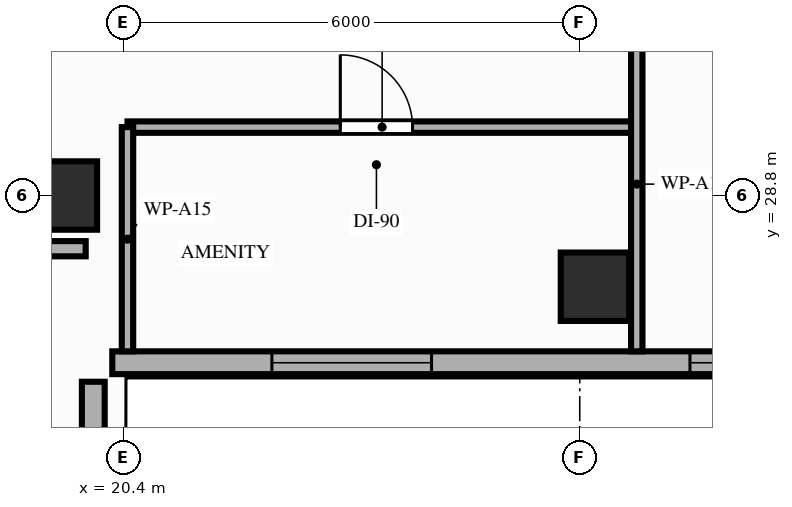
"""IFC4 building model, lengths in metres.
Left out: names, types, materials, properties, quantities, classifications, styles, units other than length and angle.
Written with IfcOpenShell. Run it as: python <this file> out.ifc"""

import sys

from ifc_helpers import new_model, si_unit, direction, frame, frame_2d, origin, origin_2d, place, context, subcontext, project, spatial, rectangle, extrude, element, fill, save


model = new_model("IFC4")
c1 = context("Model", 3, precision=1e-05, world=origin(), true_north=direction((0.0, 1.0)))
c2 = subcontext(c1, "Body", "Model", "MODEL_VIEW")
j1 = project(units=[si_unit("LENGTHUNIT", "METRE"), si_unit("PLANEANGLEUNIT", "RADIAN")], contexts=[c1])
p1 = place(None, origin())
s1 = spatial("IfcSite", under=j1, at=p1, CompositionType="ELEMENT")
p2 = place(p1, origin())
s2 = spatial("IfcBuilding", under=s1, at=p2, CompositionType="ELEMENT")
p3 = place(p2, frame((0.0, 0.0, 182.4)))
s3 = spatial("IfcBuildingStorey", under=s2, at=p3, CompositionType="ELEMENT", Elevation=182.4)
for number, where, z_axis, x_axis in (
    (1, (19.6, 28.8, 0.0), (0.0, 0.0, 1.0), (1.0, 0.0, 0.0)),
    (2, (26.6, 27.6, 0.0), (0.0, 0.0, 1.0), (1.0, 0.0, 0.0)),
):
    element("IfcColumn", number, at=place(p3, frame(where, z_axis=z_axis, x_axis=x_axis)), inside=s3, PredefinedType="COLUMN", context=c2, shape_type="SweptSolid", body=[
        extrude(rectangle(XDim=0.9, YDim=0.9, at=origin_2d()), origin(), (0.0, 0.0, 1.0), 3.2),
    ])
p4 = place(p3, frame((20.0, 8.8, 0.0), z_axis=(0.0, 0.0, 1.0), x_axis=(0.0, 1.0, 0.0)))
e3 = element("IfcWall", 3, at=p4, inside=s3, PredefinedType="STANDARD", context=c2, shape_type="SweptSolid", body=[
    extrude(rectangle(XDim=17.55, YDim=0.3, at=frame_2d((8.775, 0.0))), origin(), (0.0, 0.0, 1.0), 2.45),
])
p5 = place(p4, frame((5.12, 0.0, 0.85)))
e4 = element("IfcOpeningElement", 4, at=p5, cuts=e3, PredefinedType="OPENING", context=c2, shape_type="SweptSolid", body=[
    extrude(rectangle(XDim=2.1, YDim=1.35, at=frame_2d((1.05, 0.675))), frame((0.0, 0.16, 0.0), z_axis=(0.0, -1.0, 0.0), x_axis=(1.0, 0.0, 0.0)), (0.0, 0.0, 1.0), 0.32),
])
p6 = place(p3, frame((20.25, 26.6, 0.0), z_axis=(0.0, 0.0, 1.0), x_axis=(1.0, 0.0, 0.0)))
e5 = element("IfcWall", 5, at=p6, inside=s3, PredefinedType="STANDARD", context=c2, shape_type="SweptSolid", body=[
    extrude(rectangle(XDim=21.35, YDim=0.3, at=frame_2d((10.675, 0.0))), origin(), (0.0, 0.0, 1.0), 2.71),
])
p7 = place(p6, frame((18.43, 0.0, 0.85)))
e6 = element("IfcOpeningElement", 6, at=p7, cuts=e5, PredefinedType="OPENING", context=c2, shape_type="SweptSolid", body=[
    extrude(rectangle(XDim=2.1, YDim=1.61, at=frame_2d((1.05, 0.805))), frame((0.0, 0.16, 0.0), z_axis=(0.0, -1.0, 0.0), x_axis=(1.0, 0.0, 0.0)), (0.0, 0.0, 1.0), 0.32),
])
p8 = place(p6, frame((2.1, 0.0, 0.85)))
e7 = element("IfcOpeningElement", 7, at=p8, cuts=e5, PredefinedType="OPENING", context=c2, shape_type="SweptSolid", body=[
    extrude(rectangle(XDim=2.1, YDim=1.61, at=frame_2d((1.05, 0.805))), frame((0.0, 0.16, 0.0), z_axis=(0.0, -1.0, 0.0), x_axis=(1.0, 0.0, 0.0)), (0.0, 0.0, 1.0), 0.32),
])
p9 = place(p6, frame((7.6, 0.0, 0.85)))
e8 = element("IfcOpeningElement", 8, at=p9, cuts=e5, PredefinedType="OPENING", context=c2, shape_type="SweptSolid", body=[
    extrude(rectangle(XDim=2.1, YDim=1.61, at=frame_2d((1.05, 0.805))), frame((0.0, 0.16, 0.0), z_axis=(0.0, -1.0, 0.0), x_axis=(1.0, 0.0, 0.0)), (0.0, 0.0, 1.0), 0.32),
])
p10 = place(p3, frame((11.01, 28.1, 0.0), z_axis=(0.0, 0.0, 1.0), x_axis=(1.0, 0.0, 0.0)))
e9 = element("IfcWall", 9, at=p10, inside=s3, PredefinedType="PARTITIONING", context=c2, shape_type="SweptSolid", body=[
    extrude(rectangle(XDim=8.89, YDim=0.2, at=frame_2d((4.445, 0.0))), origin(), (0.0, 0.0, 1.0), 2.45),
])
p11 = place(p3, frame((20.45, 29.7, 0.0), z_axis=(0.0, 0.0, 1.0), x_axis=(1.0, 0.0, 0.0)))
e10 = element("IfcWall", 10, at=p11, inside=s3, PredefinedType="PARTITIONING", context=c2, shape_type="SweptSolid", body=[
    extrude(rectangle(XDim=6.7, YDim=0.15, at=frame_2d((3.35, 0.0))), origin(), (0.0, 0.0, 1.0), 3.02),
])
p12 = place(p11, frame((2.8, 0.0, 0.0)))
e11 = element("IfcOpeningElement", 11, at=p12, cuts=e10, PredefinedType="OPENING", context=c2, shape_type="SweptSolid", body=[
    extrude(rectangle(XDim=0.95, YDim=2.15, at=frame_2d((0.475, 1.075))), frame((0.0, 0.085, 0.0), z_axis=(0.0, -1.0, 0.0), x_axis=(1.0, 0.0, 0.0)), (0.0, 0.0, 1.0), 0.17),
])
p13 = place(p3, frame((20.45, 26.75, 0.0), z_axis=(0.0, 0.0, 1.0), x_axis=(0.0, 1.0, 0.0)))
e12 = element("IfcWall", 12, at=p13, inside=s3, PredefinedType="PARTITIONING", context=c2, shape_type="SweptSolid", body=[
    extrude(rectangle(XDim=2.95, YDim=0.15, at=frame_2d((1.475, 0.0))), origin(), (0.0, 0.0, 1.0), 2.45),
])
p14 = place(p3, frame((27.15, 26.75, 0.0), z_axis=(0.0, 0.0, 1.0), x_axis=(0.0, 1.0, 0.0)))
e13 = element("IfcWall", 13, at=p14, inside=s3, PredefinedType="PARTITIONING", context=c2, shape_type="SweptSolid", body=[
    extrude(rectangle(XDim=4.4, YDim=0.15, at=frame_2d((2.2, 0.0))), origin(), (0.0, 0.0, 1.0), 2.45),
])
p15 = place(p8, origin())
e14 = element("IfcWindow", 14, at=p15, inside=s3, PartitioningType="SINGLE_PANEL", PredefinedType="WINDOW", context=c2, shape_type="SweptSolid", body=[
    extrude(rectangle(XDim=2.1, YDim=1.61, at=frame_2d((1.05, 0.805))), frame((0.0, 0.03, 0.0), z_axis=(0.0, -1.0, 0.0), x_axis=(1.0, 0.0, 0.0)), (0.0, 0.0, 1.0), 0.06),
])
fill(e7, e14)
p16 = place(p9, origin())
e15 = element("IfcWindow", 15, at=p16, inside=s3, PartitioningType="SINGLE_PANEL", PredefinedType="WINDOW", context=c2, shape_type="SweptSolid", body=[
    extrude(rectangle(XDim=2.1, YDim=1.61, at=frame_2d((1.05, 0.805))), frame((0.0, 0.03, 0.0), z_axis=(0.0, -1.0, 0.0), x_axis=(1.0, 0.0, 0.0)), (0.0, 0.0, 1.0), 0.06),
])
fill(e8, e15)
p17 = place(p12, origin())
e16 = element("IfcDoor", 16, at=p17, inside=s3, OperationType="SINGLE_SWING_LEFT", PredefinedType="DOOR", context=c2, shape_type="SweptSolid", body=[
    extrude(rectangle(XDim=0.95, YDim=2.15, at=frame_2d((0.475, 1.075))), frame((0.0, 0.025, 0.0), z_axis=(0.0, -1.0, 0.0), x_axis=(1.0, 0.0, 0.0)), (0.0, 0.0, 1.0), 0.05),
])
fill(e11, e16)
save(model, sys.argv[1])
